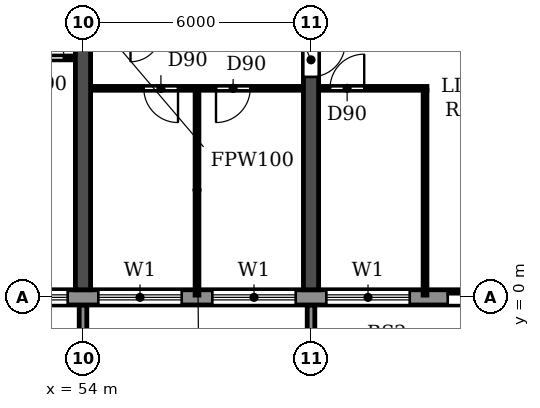
"""IFC4 building model, lengths in metres.
Left out: names, types, materials, properties, quantities, classifications, styles, units other than length and angle.
Written with IfcOpenShell. Run it as: python <this file> out.ifc"""

import sys

from ifc_helpers import new_model, si_unit, direction, frame, frame_2d, origin, place, context, subcontext, project, spatial, polyline, rectangle, outline, extrude, source, transform, mapped, element, fill, save


model = new_model("IFC4")
c1 = context("Model", 3, precision=1e-05, world=origin(), true_north=direction((0.0, 1.0)))
c2 = subcontext(c1, "Body", "Model", "MODEL_VIEW")
j1 = project(units=[si_unit("LENGTHUNIT", "METRE"), si_unit("PLANEANGLEUNIT", "RADIAN")], contexts=[c1])
p1 = place(None, origin())
s1 = spatial("IfcSite", under=j1, at=p1, CompositionType="ELEMENT")
p2 = place(p1, origin())
s2 = spatial("IfcBuilding", under=s1, at=p2, CompositionType="ELEMENT")
p3 = place(p2, frame((0.0, 0.0, 26.7)))
s3 = spatial("IfcBuildingStorey", under=s2, at=p3, CompositionType="ELEMENT", Elevation=26.7)
p4 = place(p3, frame((54.0, 0.2, 0.0), z_axis=(0.0, 0.0, 1.0), x_axis=(0.0, 1.0, 0.0)))
e1 = element("IfcWall", 1, at=p4, inside=s3, PredefinedType="SHEAR", context=c2, shape_type="SweptSolid", body=[
    extrude(rectangle(XDim=11.65, YDim=0.4, at=frame_2d((5.825, 0.0))), origin(), (0.0, 0.0, 1.0), 3.05),
])
p5 = place(p3, frame((60.0, 0.2, 0.0), z_axis=(0.0, 0.0, 1.0), x_axis=(0.0, 1.0, 0.0)))
e2 = element("IfcWall", 2, at=p5, inside=s3, PredefinedType="SHEAR", context=c2, shape_type="SweptSolid", body=[
    extrude(rectangle(XDim=11.65, YDim=0.4, at=frame_2d((5.825, 0.0))), origin(), (0.0, 0.0, 1.0), 3.05),
])
p6 = place(p5, frame((5.6, 0.0, 0.0)))
e3 = element("IfcOpeningElement", 3, at=p6, cuts=e2, PredefinedType="OPENING", context=c2, shape_type="SweptSolid", body=[
    extrude(rectangle(XDim=0.9, YDim=2.1, at=frame_2d((0.45, 1.05))), frame((0.0, 0.21, 0.0), z_axis=(0.0, -1.0, 0.0), x_axis=(1.0, 0.0, 0.0)), (0.0, 0.0, 1.0), 0.42),
])
p7 = place(p3, frame((4.683, 0.0, 0.0), z_axis=(0.0, 0.0, 1.0), x_axis=(1.0, 0.0, 0.0)))
e4 = element("IfcWall", 4, at=p7, inside=s3, PredefinedType="STANDARD", context=c2, shape_type="SweptSolid", body=[
    extrude(rectangle(XDim=92.634, YDim=0.4, at=frame_2d((46.317, 0.0))), origin(), (0.0, 0.0, 1.0), 3.05),
])
p8 = place(p7, frame((1.717, 0.0, 0.9)))
e5 = element("IfcOpeningElement", 5, at=p8, cuts=e4, PredefinedType="OPENING", context=c2, shape_type="SweptSolid", body=[
    extrude(rectangle(XDim=2.2, YDim=1.5, at=frame_2d((1.1, 0.75))), frame((0.0, 0.21, 0.0), z_axis=(0.0, -1.0, 0.0), x_axis=(1.0, 0.0, 0.0)), (0.0, 0.0, 1.0), 0.42),
])
p9 = place(p7, frame((4.717, 0.0, 0.9)))
e6 = element("IfcOpeningElement", 6, at=p9, cuts=e4, PredefinedType="OPENING", context=c2, shape_type="SweptSolid", body=[
    extrude(rectangle(XDim=2.2, YDim=1.5, at=frame_2d((1.1, 0.75))), frame((0.0, 0.21, 0.0), z_axis=(0.0, -1.0, 0.0), x_axis=(1.0, 0.0, 0.0)), (0.0, 0.0, 1.0), 0.42),
])
p10 = place(p7, frame((7.717, 0.0, 0.9)))
e7 = element("IfcOpeningElement", 7, at=p10, cuts=e4, PredefinedType="OPENING", context=c2, shape_type="SweptSolid", body=[
    extrude(rectangle(XDim=2.2, YDim=1.5, at=frame_2d((1.1, 0.75))), frame((0.0, 0.21, 0.0), z_axis=(0.0, -1.0, 0.0), x_axis=(1.0, 0.0, 0.0)), (0.0, 0.0, 1.0), 0.42),
])
p11 = place(p7, frame((10.717, 0.0, 0.9)))
e8 = element("IfcOpeningElement", 8, at=p11, cuts=e4, PredefinedType="OPENING", context=c2, shape_type="SweptSolid", body=[
    extrude(rectangle(XDim=2.2, YDim=1.5, at=frame_2d((1.1, 0.75))), frame((0.0, 0.21, 0.0), z_axis=(0.0, -1.0, 0.0), x_axis=(1.0, 0.0, 0.0)), (0.0, 0.0, 1.0), 0.42),
])
p12 = place(p7, frame((13.717, 0.0, 0.9)))
e9 = element("IfcOpeningElement", 9, at=p12, cuts=e4, PredefinedType="OPENING", context=c2, shape_type="SweptSolid", body=[
    extrude(rectangle(XDim=2.2, YDim=1.5, at=frame_2d((1.1, 0.75))), frame((0.0, 0.21, 0.0), z_axis=(0.0, -1.0, 0.0), x_axis=(1.0, 0.0, 0.0)), (0.0, 0.0, 1.0), 0.42),
])
p13 = place(p7, frame((16.717, 0.0, 0.9)))
e10 = element("IfcOpeningElement", 10, at=p13, cuts=e4, PredefinedType="OPENING", context=c2, shape_type="SweptSolid", body=[
    extrude(rectangle(XDim=2.2, YDim=1.5, at=frame_2d((1.1, 0.75))), frame((0.0, 0.21, 0.0), z_axis=(0.0, -1.0, 0.0), x_axis=(1.0, 0.0, 0.0)), (0.0, 0.0, 1.0), 0.42),
])
p14 = place(p7, frame((19.917, 0.0, 0.0)))
e11 = element("IfcOpeningElement", 11, at=p14, cuts=e4, PredefinedType="OPENING", context=c2, shape_type="SweptSolid", body=[
    extrude(rectangle(XDim=1.8, YDim=2.4, at=frame_2d((0.9, 1.2))), frame((0.0, 0.21, 0.0), z_axis=(0.0, -1.0, 0.0), x_axis=(1.0, 0.0, 0.0)), (0.0, 0.0, 1.0), 0.42),
])
p15 = place(p7, frame((22.717, 0.0, 0.9)))
e12 = element("IfcOpeningElement", 12, at=p15, cuts=e4, PredefinedType="OPENING", context=c2, shape_type="SweptSolid", body=[
    extrude(rectangle(XDim=2.2, YDim=1.5, at=frame_2d((1.1, 0.75))), frame((0.0, 0.21, 0.0), z_axis=(0.0, -1.0, 0.0), x_axis=(1.0, 0.0, 0.0)), (0.0, 0.0, 1.0), 0.42),
])
p16 = place(p7, frame((25.717, 0.0, 0.9)))
e13 = element("IfcOpeningElement", 13, at=p16, cuts=e4, PredefinedType="OPENING", context=c2, shape_type="SweptSolid", body=[
    extrude(rectangle(XDim=2.2, YDim=1.5, at=frame_2d((1.1, 0.75))), frame((0.0, 0.21, 0.0), z_axis=(0.0, -1.0, 0.0), x_axis=(1.0, 0.0, 0.0)), (0.0, 0.0, 1.0), 0.42),
])
p17 = place(p7, frame((28.717, 0.0, 0.9)))
e14 = element("IfcOpeningElement", 14, at=p17, cuts=e4, PredefinedType="OPENING", context=c2, shape_type="SweptSolid", body=[
    extrude(rectangle(XDim=2.2, YDim=1.5, at=frame_2d((1.1, 0.75))), frame((0.0, 0.21, 0.0), z_axis=(0.0, -1.0, 0.0), x_axis=(1.0, 0.0, 0.0)), (0.0, 0.0, 1.0), 0.42),
])
p18 = place(p7, frame((31.917, 0.0, 0.0)))
e15 = element("IfcOpeningElement", 15, at=p18, cuts=e4, PredefinedType="OPENING", context=c2, shape_type="SweptSolid", body=[
    extrude(rectangle(XDim=1.8, YDim=2.4, at=frame_2d((0.9, 1.2))), frame((0.0, 0.21, 0.0), z_axis=(0.0, -1.0, 0.0), x_axis=(1.0, 0.0, 0.0)), (0.0, 0.0, 1.0), 0.42),
])
p19 = place(p7, frame((34.717, 0.0, 0.9)))
e16 = element("IfcOpeningElement", 16, at=p19, cuts=e4, PredefinedType="OPENING", context=c2, shape_type="SweptSolid", body=[
    extrude(rectangle(XDim=2.2, YDim=1.5, at=frame_2d((1.1, 0.75))), frame((0.0, 0.21, 0.0), z_axis=(0.0, -1.0, 0.0), x_axis=(1.0, 0.0, 0.0)), (0.0, 0.0, 1.0), 0.42),
])
p20 = place(p7, frame((37.717, 0.0, 0.9)))
e17 = element("IfcOpeningElement", 17, at=p20, cuts=e4, PredefinedType="OPENING", context=c2, shape_type="SweptSolid", body=[
    extrude(rectangle(XDim=2.2, YDim=1.5, at=frame_2d((1.1, 0.75))), frame((0.0, 0.21, 0.0), z_axis=(0.0, -1.0, 0.0), x_axis=(1.0, 0.0, 0.0)), (0.0, 0.0, 1.0), 0.42),
])
p21 = place(p7, frame((40.717, 0.0, 0.9)))
e18 = element("IfcOpeningElement", 18, at=p21, cuts=e4, PredefinedType="OPENING", context=c2, shape_type="SweptSolid", body=[
    extrude(rectangle(XDim=2.2, YDim=1.5, at=frame_2d((1.1, 0.75))), frame((0.0, 0.21, 0.0), z_axis=(0.0, -1.0, 0.0), x_axis=(1.0, 0.0, 0.0)), (0.0, 0.0, 1.0), 0.42),
])
p22 = place(p7, frame((43.917, 0.0, 0.0)))
e19 = element("IfcOpeningElement", 19, at=p22, cuts=e4, PredefinedType="OPENING", context=c2, shape_type="SweptSolid", body=[
    extrude(rectangle(XDim=1.8, YDim=2.4, at=frame_2d((0.9, 1.2))), frame((0.0, 0.21, 0.0), z_axis=(0.0, -1.0, 0.0), x_axis=(1.0, 0.0, 0.0)), (0.0, 0.0, 1.0), 0.42),
])
p23 = place(p7, frame((46.717, 0.0, 0.9)))
e20 = element("IfcOpeningElement", 20, at=p23, cuts=e4, PredefinedType="OPENING", context=c2, shape_type="SweptSolid", body=[
    extrude(rectangle(XDim=2.2, YDim=1.5, at=frame_2d((1.1, 0.75))), frame((0.0, 0.21, 0.0), z_axis=(0.0, -1.0, 0.0), x_axis=(1.0, 0.0, 0.0)), (0.0, 0.0, 1.0), 0.42),
])
p24 = place(p7, frame((49.717, 0.0, 0.9)))
e21 = element("IfcOpeningElement", 21, at=p24, cuts=e4, PredefinedType="OPENING", context=c2, shape_type="SweptSolid", body=[
    extrude(rectangle(XDim=2.2, YDim=1.5, at=frame_2d((1.1, 0.75))), frame((0.0, 0.21, 0.0), z_axis=(0.0, -1.0, 0.0), x_axis=(1.0, 0.0, 0.0)), (0.0, 0.0, 1.0), 0.42),
])
p25 = place(p7, frame((52.717, 0.0, 0.9)))
e22 = element("IfcOpeningElement", 22, at=p25, cuts=e4, PredefinedType="OPENING", context=c2, shape_type="SweptSolid", body=[
    extrude(rectangle(XDim=2.2, YDim=1.5, at=frame_2d((1.1, 0.75))), frame((0.0, 0.21, 0.0), z_axis=(0.0, -1.0, 0.0), x_axis=(1.0, 0.0, 0.0)), (0.0, 0.0, 1.0), 0.42),
])
p26 = place(p7, frame((55.717, 0.0, 0.9)))
e23 = element("IfcOpeningElement", 23, at=p26, cuts=e4, PredefinedType="OPENING", context=c2, shape_type="SweptSolid", body=[
    extrude(rectangle(XDim=2.2, YDim=1.5, at=frame_2d((1.1, 0.75))), frame((0.0, 0.21, 0.0), z_axis=(0.0, -1.0, 0.0), x_axis=(1.0, 0.0, 0.0)), (0.0, 0.0, 1.0), 0.42),
])
p27 = place(p7, frame((58.917, 0.0, 0.0)))
e24 = element("IfcOpeningElement", 24, at=p27, cuts=e4, PredefinedType="OPENING", context=c2, shape_type="SweptSolid", body=[
    extrude(rectangle(XDim=1.8, YDim=2.4, at=frame_2d((0.9, 1.2))), frame((0.0, 0.21, 0.0), z_axis=(0.0, -1.0, 0.0), x_axis=(1.0, 0.0, 0.0)), (0.0, 0.0, 1.0), 0.42),
])
p28 = place(p7, frame((61.717, 0.0, 0.9)))
e25 = element("IfcOpeningElement", 25, at=p28, cuts=e4, PredefinedType="OPENING", context=c2, shape_type="SweptSolid", body=[
    extrude(rectangle(XDim=2.2, YDim=1.5, at=frame_2d((1.1, 0.75))), frame((0.0, 0.21, 0.0), z_axis=(0.0, -1.0, 0.0), x_axis=(1.0, 0.0, 0.0)), (0.0, 0.0, 1.0), 0.42),
])
p29 = place(p7, frame((64.717, 0.0, 0.9)))
e26 = element("IfcOpeningElement", 26, at=p29, cuts=e4, PredefinedType="OPENING", context=c2, shape_type="SweptSolid", body=[
    extrude(rectangle(XDim=2.2, YDim=1.5, at=frame_2d((1.1, 0.75))), frame((0.0, 0.21, 0.0), z_axis=(0.0, -1.0, 0.0), x_axis=(1.0, 0.0, 0.0)), (0.0, 0.0, 1.0), 0.42),
])
p30 = place(p7, frame((67.717, 0.0, 0.9)))
e27 = element("IfcOpeningElement", 27, at=p30, cuts=e4, PredefinedType="OPENING", context=c2, shape_type="SweptSolid", body=[
    extrude(rectangle(XDim=2.2, YDim=1.5, at=frame_2d((1.1, 0.75))), frame((0.0, 0.21, 0.0), z_axis=(0.0, -1.0, 0.0), x_axis=(1.0, 0.0, 0.0)), (0.0, 0.0, 1.0), 0.42),
])
p31 = place(p7, frame((70.917, 0.0, 0.0)))
e28 = element("IfcOpeningElement", 28, at=p31, cuts=e4, PredefinedType="OPENING", context=c2, shape_type="SweptSolid", body=[
    extrude(rectangle(XDim=1.8, YDim=2.4, at=frame_2d((0.9, 1.2))), frame((0.0, 0.21, 0.0), z_axis=(0.0, -1.0, 0.0), x_axis=(1.0, 0.0, 0.0)), (0.0, 0.0, 1.0), 0.42),
])
p32 = place(p7, frame((73.717, 0.0, 0.9)))
e29 = element("IfcOpeningElement", 29, at=p32, cuts=e4, PredefinedType="OPENING", context=c2, shape_type="SweptSolid", body=[
    extrude(rectangle(XDim=2.2, YDim=1.5, at=frame_2d((1.1, 0.75))), frame((0.0, 0.21, 0.0), z_axis=(0.0, -1.0, 0.0), x_axis=(1.0, 0.0, 0.0)), (0.0, 0.0, 1.0), 0.42),
])
p33 = place(p7, frame((76.717, 0.0, 0.9)))
e30 = element("IfcOpeningElement", 30, at=p33, cuts=e4, PredefinedType="OPENING", context=c2, shape_type="SweptSolid", body=[
    extrude(rectangle(XDim=2.2, YDim=1.5, at=frame_2d((1.1, 0.75))), frame((0.0, 0.21, 0.0), z_axis=(0.0, -1.0, 0.0), x_axis=(1.0, 0.0, 0.0)), (0.0, 0.0, 1.0), 0.42),
])
p34 = place(p7, frame((79.717, 0.0, 0.9)))
e31 = element("IfcOpeningElement", 31, at=p34, cuts=e4, PredefinedType="OPENING", context=c2, shape_type="SweptSolid", body=[
    extrude(rectangle(XDim=2.2, YDim=1.5, at=frame_2d((1.1, 0.75))), frame((0.0, 0.21, 0.0), z_axis=(0.0, -1.0, 0.0), x_axis=(1.0, 0.0, 0.0)), (0.0, 0.0, 1.0), 0.42),
])
p35 = place(p7, frame((82.717, 0.0, 0.9)))
e32 = element("IfcOpeningElement", 32, at=p35, cuts=e4, PredefinedType="OPENING", context=c2, shape_type="SweptSolid", body=[
    extrude(rectangle(XDim=2.2, YDim=1.5, at=frame_2d((1.1, 0.75))), frame((0.0, 0.21, 0.0), z_axis=(0.0, -1.0, 0.0), x_axis=(1.0, 0.0, 0.0)), (0.0, 0.0, 1.0), 0.42),
])
p36 = place(p7, frame((85.717, 0.0, 0.9)))
e33 = element("IfcOpeningElement", 33, at=p36, cuts=e4, PredefinedType="OPENING", context=c2, shape_type="SweptSolid", body=[
    extrude(rectangle(XDim=2.2, YDim=1.5, at=frame_2d((1.1, 0.75))), frame((0.0, 0.21, 0.0), z_axis=(0.0, -1.0, 0.0), x_axis=(1.0, 0.0, 0.0)), (0.0, 0.0, 1.0), 0.42),
])
p37 = place(p7, frame((88.717, 0.0, 0.9)))
e34 = element("IfcOpeningElement", 34, at=p37, cuts=e4, PredefinedType="OPENING", context=c2, shape_type="SweptSolid", body=[
    extrude(rectangle(XDim=2.2, YDim=1.5, at=frame_2d((1.1, 0.75))), frame((0.0, 0.21, 0.0), z_axis=(0.0, -1.0, 0.0), x_axis=(1.0, 0.0, 0.0)), (0.0, 0.0, 1.0), 0.42),
])
m1 = source(origin(), c2, "Body", "SweptSolid", [
    extrude(outline(polyline([(0.0, 0.0), (0.2, 0.0), (0.2, 1.65), (0.0, 1.65), (0.0, 0.0)])), origin(), (0.0, 0.0, 1.0), 3.1),
])
for number, where in (
    (35, (53.9, -1.85, 0.0)),
    (36, (59.9, -1.85, 0.0)),
):
    element("IfcWall", number, at=place(p3, frame(where)), inside=s3, PredefinedType="STANDARD", context=c2, shape_type="MappedRepresentation", body=[
        mapped(m1, transform((0.0, 0.0, 0.0))),
    ])
p38 = place(p3, frame((54.21, 5.5, 0.0), z_axis=(0.0, 0.0, 1.0), x_axis=(1.0, 0.0, 0.0)))
e37 = element("IfcWall", 37, at=p38, inside=s3, PredefinedType="PARTITIONING", context=c2, shape_type="SweptSolid", body=[
    extrude(rectangle(XDim=5.58, YDim=0.1, at=frame_2d((2.79, 0.0))), origin(), (0.0, 0.0, 1.0), 3.05),
])
p39 = place(p38, frame((1.39, 0.0, 0.0)))
e38 = element("IfcOpeningElement", 38, at=p39, cuts=e37, PredefinedType="OPENING", context=c2, shape_type="SweptSolid", body=[
    extrude(rectangle(XDim=0.9, YDim=2.1, at=frame_2d((0.45, 1.05))), frame((0.0, 0.06, 0.0), z_axis=(0.0, -1.0, 0.0), x_axis=(1.0, 0.0, 0.0)), (0.0, 0.0, 1.0), 0.12),
])
p40 = place(p38, frame((3.29, 0.0, 0.0)))
e39 = element("IfcOpeningElement", 39, at=p40, cuts=e37, PredefinedType="OPENING", context=c2, shape_type="SweptSolid", body=[
    extrude(rectangle(XDim=0.9, YDim=2.1, at=frame_2d((0.45, 1.05))), frame((0.0, 0.06, 0.0), z_axis=(0.0, -1.0, 0.0), x_axis=(1.0, 0.0, 0.0)), (0.0, 0.0, 1.0), 0.12),
])
p41 = place(p3, frame((60.21, 5.5, 0.0), z_axis=(0.0, 0.0, 1.0), x_axis=(1.0, 0.0, 0.0)))
e40 = element("IfcWall", 40, at=p41, inside=s3, PredefinedType="PARTITIONING", context=c2, shape_type="SweptSolid", body=[
    extrude(rectangle(XDim=2.84, YDim=0.1, at=frame_2d((1.42, 0.0))), origin(), (0.0, 0.0, 1.0), 3.05),
])
p42 = place(p41, frame((0.29, 0.0, 0.0)))
e41 = element("IfcOpeningElement", 41, at=p42, cuts=e40, PredefinedType="OPENING", context=c2, shape_type="SweptSolid", body=[
    extrude(rectangle(XDim=0.9, YDim=2.1, at=frame_2d((0.45, 1.05))), frame((0.0, 0.06, 0.0), z_axis=(0.0, -1.0, 0.0), x_axis=(1.0, 0.0, 0.0)), (0.0, 0.0, 1.0), 0.12),
])
p43 = place(p3, frame((50.95, 6.3, 0.0), z_axis=(0.0, 0.0, 1.0), x_axis=(1.0, 0.0, 0.0)))
e42 = element("IfcWall", 42, at=p43, inside=s3, PredefinedType="PARTITIONING", context=c2, shape_type="SweptSolid", body=[
    extrude(rectangle(XDim=2.84, YDim=0.1, at=frame_2d((1.42, 0.0))), origin(), (0.0, 0.0, 1.0), 3.05),
])
p44 = place(p43, frame((1.65, 0.0, 0.0)))
e43 = element("IfcOpeningElement", 43, at=p44, cuts=e42, PredefinedType="OPENING", context=c2, shape_type="SweptSolid", body=[
    extrude(rectangle(XDim=0.9, YDim=2.1, at=frame_2d((0.45, 1.05))), frame((0.0, 0.06, 0.0), z_axis=(0.0, -1.0, 0.0), x_axis=(1.0, 0.0, 0.0)), (0.0, 0.0, 1.0), 0.12),
])
for number, where, z_axis, x_axis in (
    (44, (57.0, 0.06, 0.0), (0.0, 0.0, 1.0), (0.0, 1.0, 0.0)),
    (45, (63.0, 0.06, 0.0), (0.0, 0.0, 1.0), (0.0, 1.0, 0.0)),
):
    element("IfcWall", number, at=place(p3, frame(where, z_axis=z_axis, x_axis=x_axis)), inside=s3, PredefinedType="PARTITIONING", context=c2, shape_type="SweptSolid", body=[
        extrude(rectangle(XDim=5.39, YDim=0.1, at=frame_2d((2.695, 0.0))), origin(), (0.0, 0.0, 1.0), 3.05),
    ])
p45 = place(p23, origin())
e46 = element("IfcWindow", 46, at=p45, inside=s3, PartitioningType="DOUBLE_PANEL_HORIZONTAL", PredefinedType="WINDOW", context=c2, shape_type="SweptSolid", body=[
    extrude(rectangle(XDim=2.2, YDim=1.5, at=frame_2d((1.1, 0.75))), frame((0.0, 0.03, 0.0), z_axis=(0.0, -1.0, 0.0), x_axis=(1.0, 0.0, 0.0)), (0.0, 0.0, 1.0), 0.06),
])
fill(e20, e46)
p46 = place(p24, origin())
e47 = element("IfcWindow", 47, at=p46, inside=s3, PartitioningType="DOUBLE_PANEL_HORIZONTAL", PredefinedType="WINDOW", context=c2, shape_type="SweptSolid", body=[
    extrude(rectangle(XDim=2.2, YDim=1.5, at=frame_2d((1.1, 0.75))), frame((0.0, 0.03, 0.0), z_axis=(0.0, -1.0, 0.0), x_axis=(1.0, 0.0, 0.0)), (0.0, 0.0, 1.0), 0.06),
])
fill(e21, e47)
p47 = place(p25, origin())
e48 = element("IfcWindow", 48, at=p47, inside=s3, PartitioningType="DOUBLE_PANEL_HORIZONTAL", PredefinedType="WINDOW", context=c2, shape_type="SweptSolid", body=[
    extrude(rectangle(XDim=2.2, YDim=1.5, at=frame_2d((1.1, 0.75))), frame((0.0, 0.03, 0.0), z_axis=(0.0, -1.0, 0.0), x_axis=(1.0, 0.0, 0.0)), (0.0, 0.0, 1.0), 0.06),
])
fill(e22, e48)
p48 = place(p26, origin())
e49 = element("IfcWindow", 49, at=p48, inside=s3, PartitioningType="DOUBLE_PANEL_HORIZONTAL", PredefinedType="WINDOW", context=c2, shape_type="SweptSolid", body=[
    extrude(rectangle(XDim=2.2, YDim=1.5, at=frame_2d((1.1, 0.75))), frame((0.0, 0.03, 0.0), z_axis=(0.0, -1.0, 0.0), x_axis=(1.0, 0.0, 0.0)), (0.0, 0.0, 1.0), 0.06),
])
fill(e23, e49)
p49 = place(p27, origin())
e50 = element("IfcDoor", 50, at=p49, inside=s3, OperationType="DOUBLE_DOOR_SLIDING", PredefinedType="DOOR", context=c2, shape_type="SweptSolid", body=[
    extrude(rectangle(XDim=1.8, YDim=2.4, at=frame_2d((0.9, 1.2))), frame((0.0, 0.025, 0.0), z_axis=(0.0, -1.0, 0.0), x_axis=(1.0, 0.0, 0.0)), (0.0, 0.0, 1.0), 0.05),
])
fill(e24, e50)
p50 = place(p44, origin())
e51 = element("IfcDoor", 51, at=p50, inside=s3, OperationType="SINGLE_SWING_LEFT", PredefinedType="DOOR", context=c2, shape_type="SweptSolid", body=[
    extrude(rectangle(XDim=0.9, YDim=2.1, at=frame_2d((0.45, 1.05))), frame((0.0, 0.025, 0.0), z_axis=(0.0, -1.0, 0.0), x_axis=(1.0, 0.0, 0.0)), (0.0, 0.0, 1.0), 0.05),
])
fill(e43, e51)
p51 = place(p39, frame((0.9, 0.0, 0.0), z_axis=(0.0, 0.0, 1.0), x_axis=(-1.0, 0.0, 0.0)))
e52 = element("IfcDoor", 52, at=p51, inside=s3, OperationType="SINGLE_SWING_LEFT", PredefinedType="DOOR", context=c2, shape_type="SweptSolid", body=[
    extrude(rectangle(XDim=0.9, YDim=2.1, at=frame_2d((0.45, 1.05))), frame((0.0, 0.025, 0.0), z_axis=(0.0, -1.0, 0.0), x_axis=(1.0, 0.0, 0.0)), (0.0, 0.0, 1.0), 0.05),
])
fill(e38, e52)
p52 = place(p40, frame((0.9, 0.0, 0.0), z_axis=(0.0, 0.0, 1.0), x_axis=(-1.0, 0.0, 0.0)))
e53 = element("IfcDoor", 53, at=p52, inside=s3, OperationType="SINGLE_SWING_RIGHT", PredefinedType="DOOR", context=c2, shape_type="SweptSolid", body=[
    extrude(rectangle(XDim=0.9, YDim=2.1, at=frame_2d((0.45, 1.05))), frame((0.0, 0.025, 0.0), z_axis=(0.0, -1.0, 0.0), x_axis=(1.0, 0.0, 0.0)), (0.0, 0.0, 1.0), 0.05),
])
fill(e39, e53)
p53 = place(p6, frame((0.9, 0.0, 0.0), z_axis=(0.0, 0.0, 1.0), x_axis=(-1.0, 0.0, 0.0)))
e54 = element("IfcDoor", 54, at=p53, inside=s3, OperationType="SINGLE_SWING_LEFT", PredefinedType="DOOR", context=c2, shape_type="SweptSolid", body=[
    extrude(rectangle(XDim=0.9, YDim=2.1, at=frame_2d((0.45, 1.05))), frame((0.0, 0.025, 0.0), z_axis=(0.0, -1.0, 0.0), x_axis=(1.0, 0.0, 0.0)), (0.0, 0.0, 1.0), 0.05),
])
fill(e3, e54)
p54 = place(p42, origin())
e55 = element("IfcDoor", 55, at=p54, inside=s3, OperationType="SINGLE_SWING_RIGHT", PredefinedType="DOOR", context=c2, shape_type="SweptSolid", body=[
    extrude(rectangle(XDim=0.9, YDim=2.1, at=frame_2d((0.45, 1.05))), frame((0.0, 0.025, 0.0), z_axis=(0.0, -1.0, 0.0), x_axis=(1.0, 0.0, 0.0)), (0.0, 0.0, 1.0), 0.05),
])
fill(e41, e55)
save(model, sys.argv[1])
